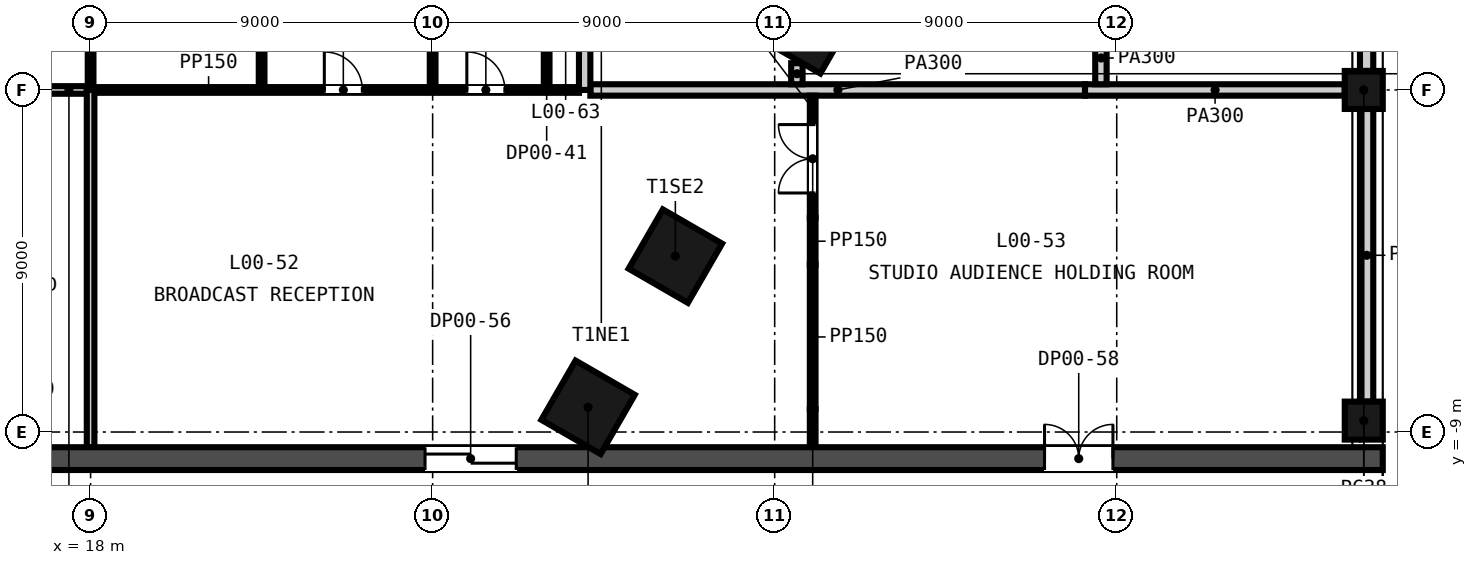
"""IFC4 building model, lengths in metres.
Left out: names, types, materials, properties, quantities, classifications, styles, units other than length and angle.
Written with IfcOpenShell. Run it as: python <this file> out.ifc"""

import sys

from ifc_helpers import new_model, si_unit, direction, frame, frame_2d, origin, origin_2d, place, context, subcontext, project, spatial, rectangle, extrude, element, fill, save


model = new_model("IFC4")
c1 = context("Model", 3, precision=1e-05, world=origin(), true_north=direction((0.0, 1.0)))
c2 = subcontext(c1, "Body", "Model", "MODEL_VIEW")
j1 = project(units=[si_unit("LENGTHUNIT", "METRE"), si_unit("PLANEANGLEUNIT", "RADIAN")], contexts=[c1])
p1 = place(None, origin())
s1 = spatial("IfcSite", under=j1, at=p1, CompositionType="ELEMENT")
p2 = place(p1, origin())
s2 = spatial("IfcBuilding", under=s1, at=p2, CompositionType="ELEMENT")
p3 = place(p2, origin())
s3 = spatial("IfcBuildingStorey", under=s2, at=p3, CompositionType="ELEMENT", Elevation=0.0)
for number, where, z_axis, x_axis in (
    (1, (31.09, -8.35, -0.3), (0.0, 0.0, 1.0), (0.5, 0.866, 0.0)),
    (2, (33.387, -4.373, -0.3), (0.0, 0.0, 1.0), (0.5, 0.866, 0.0)),
    (3, (36.872, 1.663, -0.3), (0.0, 0.0, 1.0), (0.5, 0.866, 0.0)),
):
    element("IfcColumn", number, at=place(p3, frame(where, z_axis=z_axis, x_axis=x_axis)), inside=s3, PredefinedType="COLUMN", context=c2, shape_type="SweptSolid", body=[
        extrude(rectangle(XDim=1.8, YDim=1.8, at=origin_2d()), origin(), (0.0, 0.0, 1.0), 8.9),
    ])
for number, where, z_axis, x_axis in (
    (4, (51.5, 0.0, -0.3), (0.0, 0.0, 1.0), (0.0, 1.0, 0.0)),
    (5, (51.5, -8.7, -0.3), (0.0, 0.0, 1.0), (0.0, 1.0, 0.0)),
):
    element("IfcColumn", number, at=place(p3, frame(where, z_axis=z_axis, x_axis=x_axis)), inside=s3, PredefinedType="COLUMN", context=c2, shape_type="SweptSolid", body=[
        extrude(rectangle(XDim=1.0, YDim=1.0, at=origin_2d()), origin(), (0.0, 0.0, 1.0), 8.9),
    ])
p4 = place(p3, frame((-52.0, -9.7, -0.3), z_axis=(0.0, 0.0, 1.0), x_axis=(1.0, 0.0, 0.0)))
e6 = element("IfcWall", 6, at=p4, inside=s3, PredefinedType="SOLIDWALL", context=c2, shape_type="SweptSolid", body=[
    extrude(rectangle(XDim=104.0, YDim=0.6, at=frame_2d((52.0, 0.0))), origin(), (0.0, 0.0, 1.0), 8.9),
])
p5 = place(p4, frame((67.4, 0.0, 0.3)))
e7 = element("IfcOpeningElement", 7, at=p5, cuts=e6, PredefinedType="OPENING", context=c2, shape_type="SweptSolid", body=[
    extrude(rectangle(XDim=1.2, YDim=2.1, at=frame_2d((0.6, 1.05))), frame((0.0, 0.31, 0.0), z_axis=(0.0, -1.0, 0.0), x_axis=(1.0, 0.0, 0.0)), (0.0, 0.0, 1.0), 0.62),
])
p6 = place(p4, frame((38.2, 0.0, 0.3)))
e8 = element("IfcOpeningElement", 8, at=p6, cuts=e6, PredefinedType="OPENING", context=c2, shape_type="SweptSolid", body=[
    extrude(rectangle(XDim=1.8, YDim=2.4, at=frame_2d((0.9, 1.2))), frame((0.0, 0.31, 0.0), z_axis=(0.0, -1.0, 0.0), x_axis=(1.0, 0.0, 0.0)), (0.0, 0.0, 1.0), 0.62),
])
p7 = place(p4, frame((64.0, 0.0, 0.3)))
e9 = element("IfcOpeningElement", 9, at=p7, cuts=e6, PredefinedType="OPENING", context=c2, shape_type="SweptSolid", body=[
    extrude(rectangle(XDim=1.8, YDim=2.4, at=frame_2d((0.9, 1.2))), frame((0.0, 0.31, 0.0), z_axis=(0.0, -1.0, 0.0), x_axis=(1.0, 0.0, 0.0)), (0.0, 0.0, 1.0), 0.62),
])
p8 = place(p4, frame((41.8, 0.0, 0.3)))
e10 = element("IfcOpeningElement", 10, at=p8, cuts=e6, PredefinedType="OPENING", context=c2, shape_type="SweptSolid", body=[
    extrude(rectangle(XDim=2.4, YDim=2.4, at=frame_2d((1.2, 1.2))), frame((0.0, 0.31, 0.0), z_axis=(0.0, -1.0, 0.0), x_axis=(1.0, 0.0, 0.0)), (0.0, 0.0, 1.0), 0.62),
])
p9 = place(p4, frame((59.8, 0.0, 0.3)))
e11 = element("IfcOpeningElement", 11, at=p9, cuts=e6, PredefinedType="OPENING", context=c2, shape_type="SweptSolid", body=[
    extrude(rectangle(XDim=2.4, YDim=2.4, at=frame_2d((1.2, 1.2))), frame((0.0, 0.31, 0.0), z_axis=(0.0, -1.0, 0.0), x_axis=(1.0, 0.0, 0.0)), (0.0, 0.0, 1.0), 0.62),
])
p10 = place(p4, frame((22.8, 0.0, 0.3)))
e12 = element("IfcOpeningElement", 12, at=p10, cuts=e6, PredefinedType="OPENING", context=c2, shape_type="SweptSolid", body=[
    extrude(rectangle(XDim=2.4, YDim=2.4, at=frame_2d((1.2, 1.2))), frame((0.0, 0.31, 0.0), z_axis=(0.0, -1.0, 0.0), x_axis=(1.0, 0.0, 0.0)), (0.0, 0.0, 1.0), 0.62),
])
p11 = place(p4, frame((78.8, 0.0, 0.3)))
e13 = element("IfcOpeningElement", 13, at=p11, cuts=e6, PredefinedType="OPENING", context=c2, shape_type="SweptSolid", body=[
    extrude(rectangle(XDim=2.4, YDim=2.4, at=frame_2d((1.2, 1.2))), frame((0.0, 0.31, 0.0), z_axis=(0.0, -1.0, 0.0), x_axis=(1.0, 0.0, 0.0)), (0.0, 0.0, 1.0), 0.62),
])
p12 = place(p4, frame((7.1, 0.0, 0.3)))
e14 = element("IfcOpeningElement", 14, at=p12, cuts=e6, PredefinedType="OPENING", context=c2, shape_type="SweptSolid", body=[
    extrude(rectangle(XDim=1.8, YDim=2.4, at=frame_2d((0.9, 1.2))), frame((0.0, 0.31, 0.0), z_axis=(0.0, -1.0, 0.0), x_axis=(1.0, 0.0, 0.0)), (0.0, 0.0, 1.0), 0.62),
])
p13 = place(p4, frame((95.1, 0.0, 0.3)))
e15 = element("IfcOpeningElement", 15, at=p13, cuts=e6, PredefinedType="OPENING", context=c2, shape_type="SweptSolid", body=[
    extrude(rectangle(XDim=1.8, YDim=2.4, at=frame_2d((0.9, 1.2))), frame((0.0, 0.31, 0.0), z_axis=(0.0, -1.0, 0.0), x_axis=(1.0, 0.0, 0.0)), (0.0, 0.0, 1.0), 0.62),
])
p14 = place(p3, frame((51.575, -8.2, -0.3), z_axis=(0.0, 0.0, 1.0), x_axis=(0.0, 1.0, 0.0)))
e16 = element("IfcWall", 16, at=p14, inside=s3, PredefinedType="SOLIDWALL", context=c2, shape_type="SweptSolid", body=[
    extrude(rectangle(XDim=7.7, YDim=0.35, at=frame_2d((3.85, 0.0))), origin(), (0.0, 0.0, 1.0), 8.0),
])
p15 = place(p3, frame((51.575, 0.5, -0.3), z_axis=(0.0, 0.0, 1.0), x_axis=(0.0, 1.0, 0.0)))
e17 = element("IfcWall", 17, at=p15, inside=s3, PredefinedType="SOLIDWALL", context=c2, shape_type="SweptSolid", body=[
    extrude(rectangle(XDim=7.75, YDim=0.35, at=frame_2d((3.875, 0.0))), origin(), (0.0, 0.0, 1.0), 8.0),
])
p16 = place(p3, frame((15.0, 0.0, 0.0), z_axis=(0.0, 0.0, 1.0), x_axis=(1.0, 0.0, 0.0)))
e18 = element("IfcWall", 18, at=p16, inside=s3, PredefinedType="PARTITIONING", context=c2, shape_type="SweptSolid", body=[
    extrude(rectangle(XDim=2.9, YDim=0.2, at=frame_2d((1.45, 0.0))), origin(), (0.0, 0.0, 1.0), 8.6),
])
p17 = place(p16, frame((0.9, 0.0, 0.0)))
e19 = element("IfcOpeningElement", 19, at=p17, cuts=e18, PredefinedType="OPENING", context=c2, shape_type="SweptSolid", body=[
    extrude(rectangle(XDim=1.0, YDim=2.1, at=frame_2d((0.5, 1.05))), frame((0.0, 0.11, 0.0), z_axis=(0.0, -1.0, 0.0), x_axis=(1.0, 0.0, 0.0)), (0.0, 0.0, 1.0), 0.22),
])
p18 = place(p3, frame((18.1, 0.0, 0.0), z_axis=(0.0, 0.0, 1.0), x_axis=(1.0, 0.0, 0.0)))
e20 = element("IfcWall", 20, at=p18, inside=s3, PredefinedType="PARTITIONING", context=c2, shape_type="SweptSolid", body=[
    extrude(rectangle(XDim=12.75, YDim=0.15, at=frame_2d((6.375, 0.0))), origin(), (0.0, 0.0, 1.0), 8.6),
])
p19 = place(p18, frame((6.05, 0.0, 0.0)))
e21 = element("IfcOpeningElement", 21, at=p19, cuts=e20, PredefinedType="OPENING", context=c2, shape_type="SweptSolid", body=[
    extrude(rectangle(XDim=1.0, YDim=2.1, at=frame_2d((0.5, 1.05))), frame((0.0, 0.085, 0.0), z_axis=(0.0, -1.0, 0.0), x_axis=(1.0, 0.0, 0.0)), (0.0, 0.0, 1.0), 0.17),
])
p20 = place(p18, frame((9.8, 0.0, 0.0)))
e22 = element("IfcOpeningElement", 22, at=p20, cuts=e20, PredefinedType="OPENING", context=c2, shape_type="SweptSolid", body=[
    extrude(rectangle(XDim=1.0, YDim=2.1, at=frame_2d((0.5, 1.05))), frame((0.0, 0.085, 0.0), z_axis=(0.0, -1.0, 0.0), x_axis=(1.0, 0.0, 0.0)), (0.0, 0.0, 1.0), 0.17),
])
p21 = place(p3, frame((31.15, 0.0, 0.0), z_axis=(0.0, 0.0, 1.0), x_axis=(1.0, 0.0, 0.0)))
e23 = element("IfcWall", 23, at=p21, inside=s3, PredefinedType="PARTITIONING", context=c2, shape_type="SweptSolid", body=[
    extrude(rectangle(XDim=13.016, YDim=0.3, at=frame_2d((6.508, 0.0))), origin(), (0.0, 0.0, 1.0), 7.6),
])
p22 = place(p3, frame((44.166, 0.0, 0.0), z_axis=(0.0, 0.0, 1.0), x_axis=(1.0, 0.0, 0.0)))
e24 = element("IfcWall", 24, at=p22, inside=s3, PredefinedType="PARTITIONING", context=c2, shape_type="SweptSolid", body=[
    extrude(rectangle(XDim=6.834, YDim=0.3, at=frame_2d((3.417, 0.0))), origin(), (0.0, 0.0, 1.0), 8.6),
])
p23 = place(p3, frame((18.0, -9.4, 0.0), z_axis=(0.0, 0.0, 1.0), x_axis=(0.0, 1.0, 0.0)))
e25 = element("IfcWall", 25, at=p23, inside=s3, PredefinedType="PARTITIONING", context=c2, shape_type="SweptSolid", body=[
    extrude(rectangle(XDim=9.4, YDim=0.2, at=frame_2d((4.7, 0.0))), origin(), (0.0, 0.0, 1.0), 8.6),
])
p24 = place(p3, frame((18.0, 0.0, 0.0), z_axis=(0.0, 0.0, 1.0), x_axis=(0.0, 1.0, 0.0)))
e26 = element("IfcWall", 26, at=p24, inside=s3, PredefinedType="PARTITIONING", context=c2, shape_type="SweptSolid", body=[
    extrude(rectangle(XDim=14.25, YDim=0.15, at=frame_2d((7.125, 0.0))), origin(), (0.0, 0.0, 1.0), 8.6),
])
p25 = place(p24, frame((2.4, 0.0, 0.0)))
e27 = element("IfcOpeningElement", 27, at=p25, cuts=e26, PredefinedType="OPENING", context=c2, shape_type="SweptSolid", body=[
    extrude(rectangle(XDim=1.0, YDim=2.1, at=frame_2d((0.5, 1.05))), frame((0.0, 0.085, 0.0), z_axis=(0.0, -1.0, 0.0), x_axis=(1.0, 0.0, 0.0)), (0.0, 0.0, 1.0), 0.17),
])
for number, where, z_axis, x_axis in (
    (28, (22.5, 0.075, 0.0), (0.0, 0.0, 1.0), (0.0, 1.0, 0.0)),
    (29, (27.0, 0.075, 0.0), (0.0, 0.0, 1.0), (0.0, 1.0, 0.0)),
):
    element("IfcWall", number, at=place(p3, frame(where, z_axis=z_axis, x_axis=x_axis)), inside=s3, PredefinedType="PARTITIONING", context=c2, shape_type="SweptSolid", body=[
        extrude(rectangle(XDim=5.85, YDim=0.15, at=frame_2d((2.925, 0.0))), origin(), (0.0, 0.0, 1.0), 8.6),
    ])
p26 = place(p3, frame((30.0, 0.075, 0.0), z_axis=(0.0, 0.0, 1.0), x_axis=(0.0, 1.0, 0.0)))
e30 = element("IfcWall", 30, at=p26, inside=s3, PredefinedType="PARTITIONING", context=c2, shape_type="SweptSolid", body=[
    extrude(rectangle(XDim=3.868, YDim=0.15, at=frame_2d((1.934, 0.0))), origin(), (0.0, 0.0, 1.0), 8.6),
])
p27 = place(p26, frame((1.4, 0.0, 0.0)))
e31 = element("IfcOpeningElement", 31, at=p27, cuts=e30, PredefinedType="OPENING", context=c2, shape_type="SweptSolid", body=[
    extrude(rectangle(XDim=0.9, YDim=2.1, at=frame_2d((0.45, 1.05))), frame((0.0, 0.085, 0.0), z_axis=(0.0, -1.0, 0.0), x_axis=(1.0, 0.0, 0.0)), (0.0, 0.0, 1.0), 0.17),
])
p28 = place(p3, frame((31.0, 0.0, 0.0), z_axis=(0.0, 0.0, 1.0), x_axis=(0.0, 1.0, 0.0)))
e32 = element("IfcWall", 32, at=p28, inside=s3, PredefinedType="PARTITIONING", context=c2, shape_type="SweptSolid", body=[
    extrude(rectangle(XDim=3.052, YDim=0.3, at=frame_2d((1.526, 0.0))), origin(), (0.0, 0.0, 1.0), 7.851),
])
p29 = place(p3, frame((36.584, 0.15, 0.0), z_axis=(0.0, 0.0, 1.0), x_axis=(0.0, 1.0, 0.0)))
e33 = element("IfcWall", 33, at=p29, inside=s3, PredefinedType="PARTITIONING", context=c2, shape_type="SweptSolid", body=[
    extrude(rectangle(XDim=0.554, YDim=0.3, at=frame_2d((0.277, 0.0))), origin(), (0.0, 0.0, 1.0), 7.6),
])
p30 = place(p3, frame((37.0, -9.4, 0.0), z_axis=(0.0, 0.0, 1.0), x_axis=(0.0, 1.0, 0.0)))
e34 = element("IfcWall", 34, at=p30, inside=s3, PredefinedType="PARTITIONING", context=c2, shape_type="SweptSolid", body=[
    extrude(rectangle(XDim=1.0, YDim=0.15, at=frame_2d((0.5, 0.0))), origin(), (0.0, 0.0, 1.0), 8.0),
])
p31 = place(p3, frame((37.0, -8.4, 0.0), z_axis=(0.0, 0.0, 1.0), x_axis=(0.0, 1.0, 0.0)))
e35 = element("IfcWall", 35, at=p31, inside=s3, PredefinedType="PARTITIONING", context=c2, shape_type="SweptSolid", body=[
    extrude(rectangle(XDim=3.802, YDim=0.15, at=frame_2d((1.901, 0.0))), origin(), (0.0, 0.0, 1.0), 8.6),
])
p32 = place(p3, frame((37.0, -4.598, 0.0), z_axis=(0.0, 0.0, 1.0), x_axis=(0.0, 1.0, 0.0)))
e36 = element("IfcWall", 36, at=p32, inside=s3, PredefinedType="PARTITIONING", context=c2, shape_type="SweptSolid", body=[
    extrude(rectangle(XDim=1.237, YDim=0.15, at=frame_2d((0.619, 0.0))), origin(), (0.0, 0.0, 1.0), 8.0),
])
p33 = place(p3, frame((37.0, -3.361, 0.0), z_axis=(0.0, 0.0, 1.0), x_axis=(0.0, 1.0, 0.0)))
e37 = element("IfcWall", 37, at=p33, inside=s3, PredefinedType="PARTITIONING", context=c2, shape_type="SweptSolid", body=[
    extrude(rectangle(XDim=3.211, YDim=0.15, at=frame_2d((1.605, 0.0))), origin(), (0.0, 0.0, 1.0), 7.841),
])
p34 = place(p33, frame((0.65, 0.0, 0.0)))
e38 = element("IfcOpeningElement", 38, at=p34, cuts=e37, PredefinedType="OPENING", context=c2, shape_type="SweptSolid", body=[
    extrude(rectangle(XDim=1.8, YDim=2.4, at=frame_2d((0.9, 1.2))), frame((0.0, 0.085, 0.0), z_axis=(0.0, -1.0, 0.0), x_axis=(1.0, 0.0, 0.0)), (0.0, 0.0, 1.0), 0.17),
])
p35 = place(p3, frame((44.584, 0.15, 0.0), z_axis=(0.0, 0.0, 1.0), x_axis=(0.0, 1.0, 0.0)))
e39 = element("IfcWall", 39, at=p35, inside=s3, PredefinedType="PARTITIONING", context=c2, shape_type="SweptSolid", body=[
    extrude(rectangle(XDim=1.381, YDim=0.3, at=frame_2d((0.691, 0.0))), origin(), (0.0, 0.0, 1.0), 7.841),
])
p36 = place(p34, origin())
e40 = element("IfcDoor", 40, at=p36, inside=s3, OperationType="SINGLE_SWING_LEFT", PredefinedType="DOOR", context=c2, shape_type="SweptSolid", body=[
    extrude(rectangle(XDim=1.8, YDim=2.4, at=frame_2d((0.9, 1.2))), frame((0.0, 0.025, 0.0), z_axis=(0.0, -1.0, 0.0), x_axis=(1.0, 0.0, 0.0)), (0.0, 0.0, 1.0), 0.05),
])
fill(e38, e40)
p37 = place(p19, origin())
e41 = element("IfcDoor", 41, at=p37, inside=s3, OperationType="SINGLE_SWING_LEFT", PredefinedType="DOOR", context=c2, shape_type="SweptSolid", body=[
    extrude(rectangle(XDim=1.0, YDim=2.1, at=frame_2d((0.5, 1.05))), frame((0.0, 0.025, 0.0), z_axis=(0.0, -1.0, 0.0), x_axis=(1.0, 0.0, 0.0)), (0.0, 0.0, 1.0), 0.05),
])
fill(e21, e41)
p38 = place(p20, origin())
e42 = element("IfcDoor", 42, at=p38, inside=s3, OperationType="SINGLE_SWING_LEFT", PredefinedType="DOOR", context=c2, shape_type="SweptSolid", body=[
    extrude(rectangle(XDim=1.0, YDim=2.1, at=frame_2d((0.5, 1.05))), frame((0.0, 0.025, 0.0), z_axis=(0.0, -1.0, 0.0), x_axis=(1.0, 0.0, 0.0)), (0.0, 0.0, 1.0), 0.05),
])
fill(e22, e42)
p39 = place(p11, frame((2.4, 0.0, 0.0), z_axis=(0.0, 0.0, 1.0), x_axis=(-1.0, 0.0, 0.0)))
e43 = element("IfcDoor", 43, at=p39, inside=s3, OperationType="SINGLE_SWING_LEFT", PredefinedType="DOOR", context=c2, shape_type="SweptSolid", body=[
    extrude(rectangle(XDim=2.4, YDim=2.4, at=frame_2d((1.2, 1.2))), frame((0.0, 0.025, 0.0), z_axis=(0.0, -1.0, 0.0), x_axis=(1.0, 0.0, 0.0)), (0.0, 0.0, 1.0), 0.05),
])
fill(e13, e43)
p40 = place(p13, frame((1.8, 0.0, 0.0), z_axis=(0.0, 0.0, 1.0), x_axis=(-1.0, 0.0, 0.0)))
e44 = element("IfcDoor", 44, at=p40, inside=s3, OperationType="SINGLE_SWING_LEFT", PredefinedType="DOOR", context=c2, shape_type="SweptSolid", body=[
    extrude(rectangle(XDim=1.8, YDim=2.4, at=frame_2d((0.9, 1.2))), frame((0.0, 0.025, 0.0), z_axis=(0.0, -1.0, 0.0), x_axis=(1.0, 0.0, 0.0)), (0.0, 0.0, 1.0), 0.05),
])
fill(e15, e44)
save(model, sys.argv[1])
